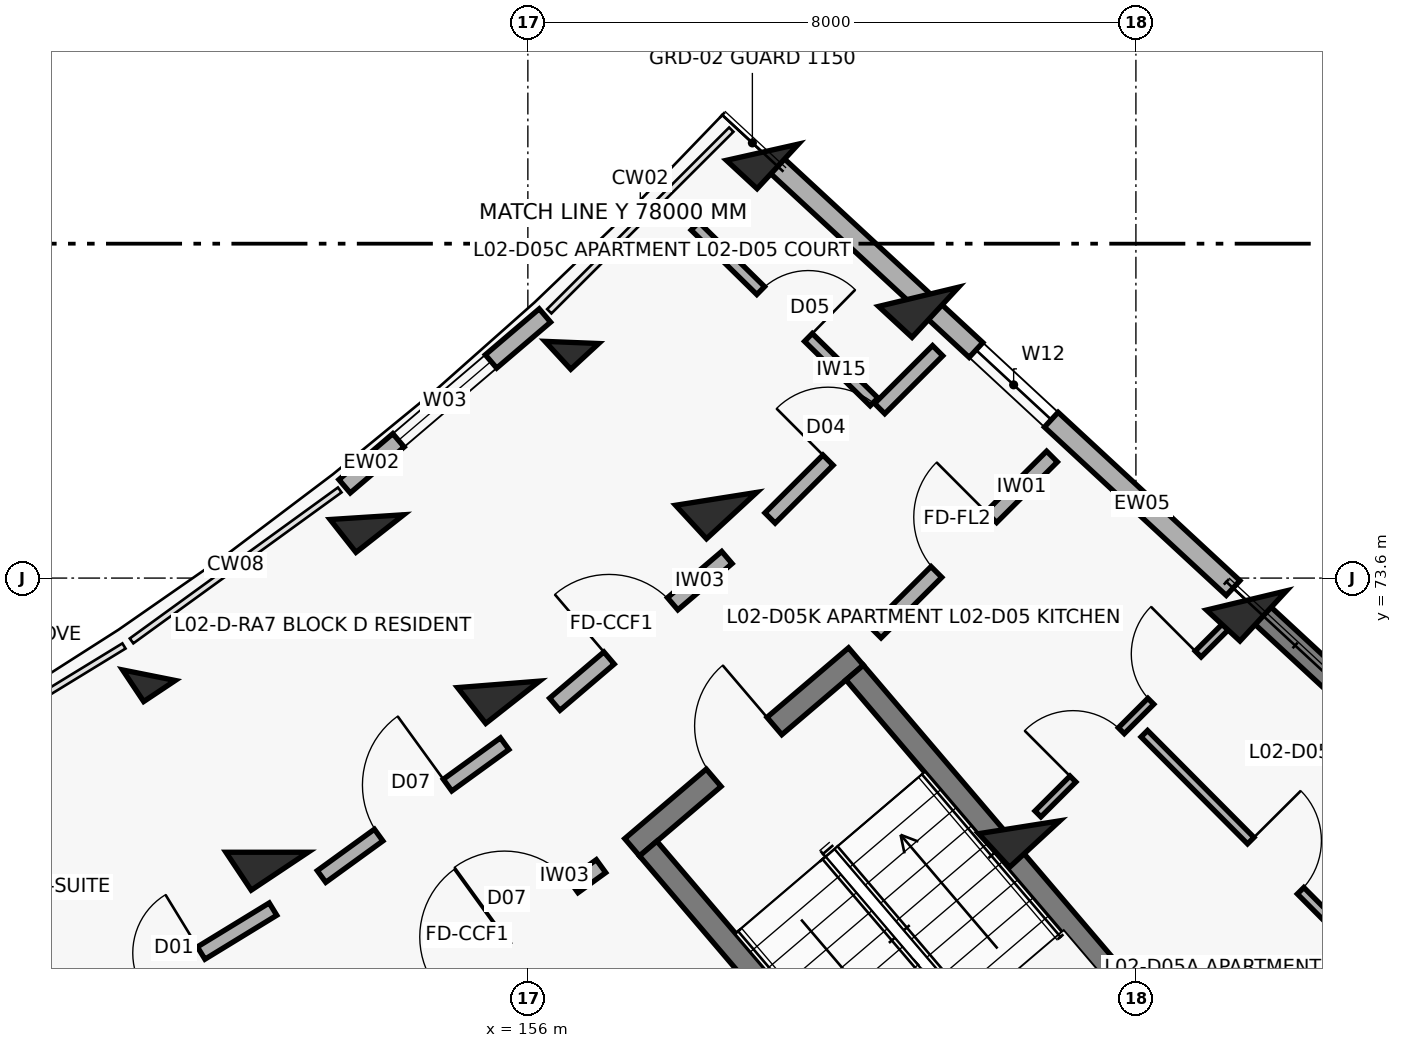
"""IFC4 building model, lengths in metres.
Left out: names, types, materials, properties, quantities, classifications, styles, units other than length and angle.
Written with IfcOpenShell. Run it as: python <this file> out.ifc"""

import sys

from ifc_helpers import new_model, si_unit, direction, frame, frame_2d, origin, origin_2d, place, context, subcontext, project, spatial, rectangle, extrude, element, fill, save


model = new_model("IFC4")
c1 = context("Model", 3, precision=1e-05, world=origin(), true_north=direction((0.0, 1.0)))
c2 = subcontext(c1, "Body", "Model", "MODEL_VIEW")
j1 = project(units=[si_unit("LENGTHUNIT", "METRE"), si_unit("PLANEANGLEUNIT", "RADIAN")], contexts=[c1])
p1 = place(None, origin())
s1 = spatial("IfcSite", under=j1, at=p1, CompositionType="ELEMENT")
p2 = place(p1, origin())
s2 = spatial("IfcBuilding", under=s1, at=p2, CompositionType="ELEMENT")
p3 = place(p2, frame((0.0, 0.0, 8.1)))
s3 = spatial("IfcBuildingStorey", under=s2, at=p3, CompositionType="ELEMENT", Elevation=8.1)
p4 = place(p3, frame((149.358, 68.03, 0.0), z_axis=(0.0, 0.0, 1.0), x_axis=(0.487859659139, -0.87292207727, 0.0)))
e1 = element("IfcColumn", 1, at=p4, inside=s3, PredefinedType="COLUMN", context=c2, shape_type="SweptSolid", body=[
    extrude(rectangle(XDim=0.6, YDim=0.9, at=origin_2d()), origin(), (0.0, 0.0, 1.0), 3.1),
])
p5 = place(p3, frame((151.015, 72.322, 0.0), z_axis=(0.0, 0.0, 1.0), x_axis=(0.554844427448, -0.83195412213, 0.0)))
e2 = element("IfcColumn", 2, at=p5, inside=s3, PredefinedType="COLUMN", context=c2, shape_type="SweptSolid", body=[
    extrude(rectangle(XDim=0.5, YDim=0.5, at=origin_2d()), origin(), (0.0, 0.0, 1.0), 3.1),
])
p6 = place(p3, frame((152.568, 69.993, 0.0), z_axis=(0.0, 0.0, 1.0), x_axis=(0.554844427448, -0.83195412213, 0.0)))
e3 = element("IfcColumn", 3, at=p6, inside=s3, PredefinedType="COLUMN", context=c2, shape_type="SweptSolid", body=[
    extrude(rectangle(XDim=0.6, YDim=0.9, at=origin_2d()), origin(), (0.0, 0.0, 1.0), 3.1),
])
p7 = place(p3, frame((153.883, 74.402, 0.0), z_axis=(0.0, 0.0, 1.0), x_axis=(0.618408395358, -0.785856893175, 0.0)))
e4 = element("IfcColumn", 4, at=p7, inside=s3, PredefinedType="COLUMN", context=c2, shape_type="SweptSolid", body=[
    extrude(rectangle(XDim=0.55, YDim=0.8, at=origin_2d()), origin(), (0.0, 0.0, 1.0), 3.1),
])
p8 = place(p3, frame((155.614, 72.202, 0.0), z_axis=(0.0, 0.0, 1.0), x_axis=(0.618408395358, -0.785856893175, 0.0)))
e5 = element("IfcColumn", 5, at=p8, inside=s3, PredefinedType="COLUMN", context=c2, shape_type="SweptSolid", body=[
    extrude(rectangle(XDim=0.6, YDim=0.9, at=origin_2d()), origin(), (0.0, 0.0, 1.0), 3.1),
])
p9 = place(p3, frame((156.579, 76.701, 0.0), z_axis=(0.0, 0.0, 1.0), x_axis=(0.678159669868, -0.73491459515, 0.0)))
e6 = element("IfcColumn", 6, at=p9, inside=s3, PredefinedType="COLUMN", context=c2, shape_type="SweptSolid", body=[
    extrude(rectangle(XDim=0.5, YDim=0.5, at=origin_2d()), origin(), (0.0, 0.0, 1.0), 3.1),
])
for number, where, z_axis, x_axis in (
    (7, (158.477, 74.643, 0.0), (0.0, 0.0, 1.0), (0.678, -0.735, 0.0)),
    (8, (162.465, 70.322, 0.0), (0.0, 0.0, 1.0), (0.678, -0.735, 0.0)),
):
    element("IfcColumn", number, at=place(p3, frame(where, z_axis=z_axis, x_axis=x_axis)), inside=s3, PredefinedType="COLUMN", context=c2, shape_type="SweptSolid", body=[
        extrude(rectangle(XDim=0.6, YDim=0.9, at=origin_2d()), origin(), (0.0, 0.0, 1.0), 3.1),
    ])
p10 = place(p3, frame((159.086, 79.204, 0.0), z_axis=(0.0, 0.0, 1.0), x_axis=(0.733729864503, -0.679441304262, 0.0)))
e9 = element("IfcColumn", 9, at=p10, inside=s3, PredefinedType="COLUMN", context=c2, shape_type="SweptSolid", body=[
    extrude(rectangle(XDim=0.55, YDim=0.8, at=origin_2d()), origin(), (0.0, 0.0, 1.0), 3.1),
])
for number, where, z_axis, x_axis in (
    (10, (161.14, 77.301, 0.0), (0.0, 0.0, 1.0), (0.734, -0.679, 0.0)),
    (11, (165.455, 73.306, 0.0), (0.0, 0.0, 1.0), (0.734, -0.679, 0.0)),
):
    element("IfcColumn", number, at=place(p3, frame(where, z_axis=z_axis, x_axis=x_axis)), inside=s3, PredefinedType="COLUMN", context=c2, shape_type="SweptSolid", body=[
        extrude(rectangle(XDim=0.6, YDim=0.9, at=origin_2d()), origin(), (0.0, 0.0, 1.0), 3.1),
    ])
p11 = place(p3, frame((165.587, 73.184, 0.0), z_axis=(0.0, 0.0, 1.0), x_axis=(0.733739663667, -0.679430721974, 0.0)))
e12 = element("IfcWall", 12, at=p11, inside=s3, PredefinedType="SHEAR", context=c2, shape_type="SweptSolid", body=[
    extrude(rectangle(XDim=4.72, YDim=0.31, at=frame_2d((2.36, 0.0))), origin(), (0.0, 0.0, 1.0), 2.86),
])
p12 = place(p3, frame((153.589, 74.808, 0.0), z_axis=(0.0, 0.0, 1.0), x_axis=(0.760985425115, 0.648768974876, 0.0)))
e13 = element("IfcWall", 13, at=p12, inside=s3, PredefinedType="SOLIDWALL", context=c2, shape_type="SweptSolid", body=[
    extrude(rectangle(XDim=3.464, YDim=0.23, at=frame_2d((1.732, 0.0))), origin(), (0.0, 0.0, 1.0), 2.25),
])
p13 = place(p12, frame((0.932, 0.0, 0.32)))
e14 = element("IfcOpeningElement", 14, at=p13, cuts=e13, PredefinedType="OPENING", context=c2, shape_type="SweptSolid", body=[
    extrude(rectangle(XDim=1.6, YDim=1.5, at=frame_2d((0.8, 0.75))), frame((0.0, 0.125, 0.0), z_axis=(0.0, -1.0, 0.0), x_axis=(1.0, 0.0, 0.0)), (0.0, 0.0, 1.0), 0.25),
])
p14 = place(p3, frame((159.262, 79.041, 0.0), z_axis=(0.0, 0.0, 1.0), x_axis=(0.733738684326, -0.679431779595, 0.0)))
e15 = element("IfcWall", 15, at=p14, inside=s3, PredefinedType="SOLIDWALL", context=c2, shape_type="SweptSolid", body=[
    extrude(rectangle(XDim=8.2, YDim=0.265, at=frame_2d((4.1, 0.0))), origin(), (0.0, 0.0, 1.0), 2.08),
])
p15 = place(p14, frame((3.59, 0.0, 0.75)))
e16 = element("IfcOpeningElement", 16, at=p15, cuts=e15, PredefinedType="OPENING", context=c2, shape_type="SweptSolid", body=[
    extrude(rectangle(XDim=1.35, YDim=1.35, at=frame_2d((0.675, 0.675))), frame((0.0, 0.142, 0.0), z_axis=(0.0, -1.0, 0.0), x_axis=(1.0, 0.0, 0.0)), (0.0, 0.0, 1.0), 0.285),
])
p16 = place(p3, frame((157.372, 70.058, 0.0), z_axis=(0.0, 0.0, 1.0), x_axis=(0.760990583254, 0.648762924495, 0.0)))
e17 = element("IfcWall", 17, at=p16, inside=s3, PredefinedType="SHEAR", context=c2, shape_type="SweptSolid", body=[
    extrude(rectangle(XDim=3.87, YDim=0.3, at=frame_2d((1.935, 0.0))), origin(), (0.0, 0.0, 1.0), 3.1),
])
p17 = place(p16, frame((1.41, 0.0, 0.0)))
e18 = element("IfcOpeningElement", 18, at=p17, cuts=e17, PredefinedType="OPENING", context=c2, shape_type="SweptSolid", body=[
    extrude(rectangle(XDim=1.05, YDim=2.15, at=frame_2d((0.525, 1.075))), frame((0.0, 0.16, 0.0), z_axis=(0.0, -1.0, 0.0), x_axis=(1.0, 0.0, 0.0)), (0.0, 0.0, 1.0), 0.32),
])
p18 = place(p3, frame((157.583, 70.041, 0.0), z_axis=(0.0, 0.0, 1.0), x_axis=(0.648762810187, -0.760990680704, 0.0)))
e19 = element("IfcWall", 19, at=p18, inside=s3, PredefinedType="SHEAR", context=c2, shape_type="SweptSolid", body=[
    extrude(rectangle(XDim=7.69, YDim=0.3, at=frame_2d((3.845, 0.0))), origin(), (0.0, 0.0, 1.0), 3.1),
])
p19 = place(p3, frame((160.3, 72.357, 0.0), z_axis=(0.0, 0.0, 1.0), x_axis=(0.648781194888, -0.760975006922, 0.0)))
e20 = element("IfcWall", 20, at=p19, inside=s3, PredefinedType="SHEAR", context=c2, shape_type="SweptSolid", body=[
    extrude(rectangle(XDim=7.69, YDim=0.3, at=frame_2d((3.845, 0.0))), origin(), (0.0, 0.0, 1.0), 3.1),
])
p20 = place(p3, frame((149.989, 67.619, 0.0), z_axis=(0.0, 0.0, 1.0), x_axis=(0.853121049608, 0.5217130195, 0.0)))
e21 = element("IfcWall", 21, at=p20, inside=s3, PredefinedType="SOLIDWALL", context=c2, shape_type="SweptSolid", body=[
    extrude(rectangle(XDim=3.116, YDim=0.19, at=frame_2d((1.558, 0.0))), origin(), (0.0, 0.0, 1.0), 2.08),
])
p21 = place(p20, frame((1.108, 0.0, 0.0)))
e22 = element("IfcOpeningElement", 22, at=p21, cuts=e21, PredefinedType="OPENING", context=c2, shape_type="SweptSolid", body=[
    extrude(rectangle(XDim=0.9, YDim=2.1, at=frame_2d((0.45, 1.05))), frame((0.0, 0.105, 0.0), z_axis=(0.0, -1.0, 0.0), x_axis=(1.0, 0.0, 0.0)), (0.0, 0.0, 1.0), 0.21),
])
p22 = place(p3, frame((154.423, 67.968, 0.0), z_axis=(0.0, 0.0, 1.0), x_axis=(0.809516127005, 0.587097641043, 0.0)))
e23 = element("IfcWall", 23, at=p22, inside=s3, PredefinedType="SOLIDWALL", context=c2, shape_type="SweptSolid", body=[
    extrude(rectangle(XDim=3.137, YDim=0.21, at=frame_2d((1.569, 0.0))), origin(), (0.0, 0.0, 1.0), 2.08),
])
p23 = place(p22, frame((0.45, 0.0, 0.0)))
e24 = element("IfcOpeningElement", 24, at=p23, cuts=e23, PredefinedType="OPENING", context=c2, shape_type="SweptSolid", body=[
    extrude(rectangle(XDim=1.1, YDim=2.15, at=frame_2d((0.55, 1.075))), frame((0.0, 0.115, 0.0), z_axis=(0.0, -1.0, 0.0), x_axis=(1.0, 0.0, 0.0)), (0.0, 0.0, 1.0), 0.23),
])
p24 = place(p22, frame((1.567, 0.0, 0.0)))
e25 = element("IfcOpeningElement", 25, at=p24, cuts=e23, PredefinedType="OPENING", context=c2, shape_type="SweptSolid", body=[
    extrude(rectangle(XDim=1.12, YDim=2.15, at=frame_2d((0.56, 1.075))), frame((0.0, 0.115, 0.0), z_axis=(0.0, -1.0, 0.0), x_axis=(1.0, 0.0, 0.0)), (0.0, 0.0, 1.0), 0.23),
])
p25 = place(p3, frame((153.285, 69.674, 0.0), z_axis=(0.0, 0.0, 1.0), x_axis=(0.809505174959, 0.587112741911, 0.0)))
e26 = element("IfcWall", 26, at=p25, inside=s3, PredefinedType="SOLIDWALL", context=c2, shape_type="SweptSolid", body=[
    extrude(rectangle(XDim=2.976, YDim=0.19, at=frame_2d((1.488, 0.0))), origin(), (0.0, 0.0, 1.0), 2.08),
])
p26 = place(p25, frame((0.928, 0.0, 0.0)))
e27 = element("IfcOpeningElement", 27, at=p26, cuts=e26, PredefinedType="OPENING", context=c2, shape_type="SweptSolid", body=[
    extrude(rectangle(XDim=1.12, YDim=2.15, at=frame_2d((0.56, 1.075))), frame((0.0, 0.105, 0.0), z_axis=(0.0, -1.0, 0.0), x_axis=(1.0, 0.0, 0.0)), (0.0, 0.0, 1.0), 0.21),
])
p27 = place(p3, frame((156.354, 71.94, 0.0), z_axis=(0.0, 0.0, 1.0), x_axis=(0.760991187621, 0.648762215579, 0.0)))
e28 = element("IfcWall", 28, at=p27, inside=s3, PredefinedType="SOLIDWALL", context=c2, shape_type="SweptSolid", body=[
    extrude(rectangle(XDim=2.976, YDim=0.21, at=frame_2d((1.488, 0.0))), origin(), (0.0, 0.0, 1.0), 2.08),
])
p28 = place(p27, frame((0.938, 0.0, 0.0)))
e29 = element("IfcOpeningElement", 29, at=p28, cuts=e28, PredefinedType="OPENING", context=c2, shape_type="SweptSolid", body=[
    extrude(rectangle(XDim=1.1, YDim=2.15, at=frame_2d((0.55, 1.075))), frame((0.0, 0.115, 0.0), z_axis=(0.0, -1.0, 0.0), x_axis=(1.0, 0.0, 0.0)), (0.0, 0.0, 1.0), 0.23),
])
p29 = place(p3, frame((160.576, 72.884, 0.0), z_axis=(0.0, 0.0, 1.0), x_axis=(0.70773973846, 0.706473256822, 0.0)))
e30 = element("IfcWall", 30, at=p29, inside=s3, PredefinedType="SOLIDWALL", context=c2, shape_type="SweptSolid", body=[
    extrude(rectangle(XDim=3.277, YDim=0.2, at=frame_2d((1.639, 0.0))), origin(), (0.0, 0.0, 1.0), 2.08),
])
p30 = place(p29, frame((1.128, 0.0, 0.0)))
e31 = element("IfcOpeningElement", 31, at=p30, cuts=e30, PredefinedType="OPENING", context=c2, shape_type="SweptSolid", body=[
    extrude(rectangle(XDim=1.02, YDim=2.15, at=frame_2d((0.51, 1.075))), frame((0.0, 0.11, 0.0), z_axis=(0.0, -1.0, 0.0), x_axis=(1.0, 0.0, 0.0)), (0.0, 0.0, 1.0), 0.22),
])
p31 = place(p3, frame((159.186, 74.39, 0.0), z_axis=(0.0, 0.0, 1.0), x_axis=(0.70773330139, 0.706479705373, 0.0)))
e32 = element("IfcWall", 32, at=p31, inside=s3, PredefinedType="SOLIDWALL", context=c2, shape_type="SweptSolid", body=[
    extrude(rectangle(XDim=3.116, YDim=0.19, at=frame_2d((1.558, 0.0))), origin(), (0.0, 0.0, 1.0), 2.08),
])
p32 = place(p31, frame((1.078, 0.0, 0.0)))
e33 = element("IfcOpeningElement", 33, at=p32, cuts=e32, PredefinedType="OPENING", context=c2, shape_type="SweptSolid", body=[
    extrude(rectangle(XDim=0.96, YDim=2.1, at=frame_2d((0.48, 1.05))), frame((0.0, 0.105, 0.0), z_axis=(0.0, -1.0, 0.0), x_axis=(1.0, 0.0, 0.0)), (0.0, 0.0, 1.0), 0.21),
])
p33 = place(p3, frame((158.2, 78.23, 0.0), z_axis=(0.0, 0.0, 1.0), x_axis=(0.713587506757, -0.700566106945, 0.0)))
e34 = element("IfcWall", 34, at=p33, inside=s3, PredefinedType="PARTITIONING", context=c2, shape_type="SweptSolid", body=[
    extrude(rectangle(XDim=3.3, YDim=0.145, at=frame_2d((1.65, 0.0))), origin(), (0.0, 0.0, 1.0), 2.08),
])
p34 = place(p33, frame((1.21, 0.0, 0.0)))
e35 = element("IfcOpeningElement", 35, at=p34, cuts=e34, PredefinedType="OPENING", context=c2, shape_type="SweptSolid", body=[
    extrude(rectangle(XDim=0.88, YDim=2.1, at=frame_2d((0.44, 1.05))), frame((0.0, 0.083, 0.0), z_axis=(0.0, -1.0, 0.0), x_axis=(1.0, 0.0, 0.0)), (0.0, 0.0, 1.0), 0.165),
])
p35 = place(p3, frame((162.711, 70.497, 0.0), z_axis=(0.0, 0.0, 1.0), x_axis=(0.70774573777, 0.706467246706, 0.0)))
e36 = element("IfcWall", 36, at=p35, inside=s3, PredefinedType="PARTITIONING", context=c2, shape_type="SweptSolid", body=[
    extrude(rectangle(XDim=3.628, YDim=0.11, at=frame_2d((1.814, 0.0))), origin(), (0.0, 0.0, 1.0), 2.08),
])
p36 = place(p35, frame((0.65, 0.0, 0.0)))
e37 = element("IfcOpeningElement", 37, at=p36, cuts=e36, PredefinedType="OPENING", context=c2, shape_type="SweptSolid", body=[
    extrude(rectangle(XDim=0.9, YDim=2.1, at=frame_2d((0.45, 1.05))), frame((0.0, 0.065, 0.0), z_axis=(0.0, -1.0, 0.0), x_axis=(1.0, 0.0, 0.0)), (0.0, 0.0, 1.0), 0.13),
])
p37 = place(p35, frame((2.098, 0.0, 0.0)))
e38 = element("IfcOpeningElement", 38, at=p37, cuts=e36, PredefinedType="OPENING", context=c2, shape_type="SweptSolid", body=[
    extrude(rectangle(XDim=0.88, YDim=2.1, at=frame_2d((0.44, 1.05))), frame((0.0, 0.065, 0.0), z_axis=(0.0, -1.0, 0.0), x_axis=(1.0, 0.0, 0.0)), (0.0, 0.0, 1.0), 0.13),
])
p38 = place(p3, frame((164.11, 71.552, 0.0), z_axis=(0.0, 0.0, 1.0), x_axis=(0.705460671411, -0.708749067789, 0.0)))
e39 = element("IfcWall", 39, at=p38, inside=s3, PredefinedType="PARTITIONING", context=c2, shape_type="SweptSolid", body=[
    extrude(rectangle(XDim=4.9, YDim=0.12, at=frame_2d((2.45, 0.0))), origin(), (0.0, 0.0, 1.0), 2.08),
])
p39 = place(p38, frame((1.985, 0.0, 0.0)))
e40 = element("IfcOpeningElement", 40, at=p39, cuts=e39, PredefinedType="OPENING", context=c2, shape_type="SweptSolid", body=[
    extrude(rectangle(XDim=0.93, YDim=2.1, at=frame_2d((0.465, 1.05))), frame((0.0, 0.07, 0.0), z_axis=(0.0, -1.0, 0.0), x_axis=(1.0, 0.0, 0.0)), (0.0, 0.0, 1.0), 0.14),
])
p40 = place(p13, origin())
e41 = element("IfcWindow", 41, at=p40, inside=s3, PartitioningType="DOUBLE_PANEL_VERTICAL", PredefinedType="WINDOW", context=c2, shape_type="SweptSolid", body=[
    extrude(rectangle(XDim=1.6, YDim=1.5, at=frame_2d((0.8, 0.75))), frame((0.0, 0.03, 0.0), z_axis=(0.0, -1.0, 0.0), x_axis=(1.0, 0.0, 0.0)), (0.0, 0.0, 1.0), 0.06),
])
fill(e14, e41)
p41 = place(p15, origin())
e42 = element("IfcWindow", 42, at=p41, inside=s3, PartitioningType="DOUBLE_PANEL_VERTICAL", PredefinedType="WINDOW", context=c2, shape_type="SweptSolid", body=[
    extrude(rectangle(XDim=1.35, YDim=1.35, at=frame_2d((0.675, 0.675))), frame((0.0, 0.03, 0.0), z_axis=(0.0, -1.0, 0.0), x_axis=(1.0, 0.0, 0.0)), (0.0, 0.0, 1.0), 0.06),
])
fill(e16, e42)
p42 = place(p17, origin())
e43 = element("IfcDoor", 43, at=p42, inside=s3, OperationType="SINGLE_SWING_RIGHT", PredefinedType="DOOR", context=c2, shape_type="SweptSolid", body=[
    extrude(rectangle(XDim=1.05, YDim=2.15, at=frame_2d((0.525, 1.075))), frame((0.0, 0.025, 0.0), z_axis=(0.0, -1.0, 0.0), x_axis=(1.0, 0.0, 0.0)), (0.0, 0.0, 1.0), 0.05),
])
fill(e18, e43)
p43 = place(p21, origin())
e44 = element("IfcDoor", 44, at=p43, inside=s3, OperationType="SINGLE_SWING_RIGHT", PredefinedType="DOOR", context=c2, shape_type="SweptSolid", body=[
    extrude(rectangle(XDim=0.9, YDim=2.1, at=frame_2d((0.45, 1.05))), frame((0.0, 0.025, 0.0), z_axis=(0.0, -1.0, 0.0), x_axis=(1.0, 0.0, 0.0)), (0.0, 0.0, 1.0), 0.05),
])
fill(e22, e44)
p44 = place(p23, origin())
e45 = element("IfcDoor", 45, at=p44, inside=s3, OperationType="SINGLE_SWING_RIGHT", PredefinedType="DOOR", context=c2, shape_type="SweptSolid", body=[
    extrude(rectangle(XDim=1.1, YDim=2.15, at=frame_2d((0.55, 1.075))), frame((0.0, 0.025, 0.0), z_axis=(0.0, -1.0, 0.0), x_axis=(1.0, 0.0, 0.0)), (0.0, 0.0, 1.0), 0.05),
])
fill(e24, e45)
p45 = place(p24, origin())
e46 = element("IfcDoor", 46, at=p45, inside=s3, OperationType="SINGLE_SWING_LEFT", PredefinedType="DOOR", context=c2, shape_type="SweptSolid", body=[
    extrude(rectangle(XDim=1.12, YDim=2.15, at=frame_2d((0.56, 1.075))), frame((0.0, 0.025, 0.0), z_axis=(0.0, -1.0, 0.0), x_axis=(1.0, 0.0, 0.0)), (0.0, 0.0, 1.0), 0.05),
])
fill(e25, e46)
p46 = place(p26, origin())
e47 = element("IfcDoor", 47, at=p46, inside=s3, OperationType="SINGLE_SWING_RIGHT", PredefinedType="DOOR", context=c2, shape_type="SweptSolid", body=[
    extrude(rectangle(XDim=1.12, YDim=2.15, at=frame_2d((0.56, 1.075))), frame((0.0, 0.025, 0.0), z_axis=(0.0, -1.0, 0.0), x_axis=(1.0, 0.0, 0.0)), (0.0, 0.0, 1.0), 0.05),
])
fill(e27, e47)
p47 = place(p28, origin())
e48 = element("IfcDoor", 48, at=p47, inside=s3, OperationType="SINGLE_SWING_LEFT", PredefinedType="DOOR", context=c2, shape_type="SweptSolid", body=[
    extrude(rectangle(XDim=1.1, YDim=2.15, at=frame_2d((0.55, 1.075))), frame((0.0, 0.025, 0.0), z_axis=(0.0, -1.0, 0.0), x_axis=(1.0, 0.0, 0.0)), (0.0, 0.0, 1.0), 0.05),
])
fill(e29, e48)
p48 = place(p30, origin())
e49 = element("IfcDoor", 49, at=p48, inside=s3, OperationType="SINGLE_SWING_RIGHT", PredefinedType="DOOR", context=c2, shape_type="SweptSolid", body=[
    extrude(rectangle(XDim=1.02, YDim=2.15, at=frame_2d((0.51, 1.075))), frame((0.0, 0.025, 0.0), z_axis=(0.0, -1.0, 0.0), x_axis=(1.0, 0.0, 0.0)), (0.0, 0.0, 1.0), 0.05),
])
fill(e31, e49)
p49 = place(p32, origin())
e50 = element("IfcDoor", 50, at=p49, inside=s3, OperationType="SINGLE_SWING_LEFT", PredefinedType="DOOR", context=c2, shape_type="SweptSolid", body=[
    extrude(rectangle(XDim=0.96, YDim=2.1, at=frame_2d((0.48, 1.05))), frame((0.0, 0.025, 0.0), z_axis=(0.0, -1.0, 0.0), x_axis=(1.0, 0.0, 0.0)), (0.0, 0.0, 1.0), 0.05),
])
fill(e33, e50)
p50 = place(p34, origin())
e51 = element("IfcDoor", 51, at=p50, inside=s3, OperationType="SINGLE_SWING_RIGHT", PredefinedType="DOOR", context=c2, shape_type="SweptSolid", body=[
    extrude(rectangle(XDim=0.88, YDim=2.1, at=frame_2d((0.44, 1.05))), frame((0.0, 0.025, 0.0), z_axis=(0.0, -1.0, 0.0), x_axis=(1.0, 0.0, 0.0)), (0.0, 0.0, 1.0), 0.05),
])
fill(e35, e51)
p51 = place(p36, origin())
e52 = element("IfcDoor", 52, at=p51, inside=s3, OperationType="SINGLE_SWING_LEFT", PredefinedType="DOOR", context=c2, shape_type="SweptSolid", body=[
    extrude(rectangle(XDim=0.9, YDim=2.1, at=frame_2d((0.45, 1.05))), frame((0.0, 0.025, 0.0), z_axis=(0.0, -1.0, 0.0), x_axis=(1.0, 0.0, 0.0)), (0.0, 0.0, 1.0), 0.05),
])
fill(e37, e52)
p52 = place(p37, origin())
e53 = element("IfcDoor", 53, at=p52, inside=s3, OperationType="SINGLE_SWING_RIGHT", PredefinedType="DOOR", context=c2, shape_type="SweptSolid", body=[
    extrude(rectangle(XDim=0.88, YDim=2.1, at=frame_2d((0.44, 1.05))), frame((0.0, 0.025, 0.0), z_axis=(0.0, -1.0, 0.0), x_axis=(1.0, 0.0, 0.0)), (0.0, 0.0, 1.0), 0.05),
])
fill(e38, e53)
p53 = place(p39, origin())
e54 = element("IfcDoor", 54, at=p53, inside=s3, OperationType="SINGLE_SWING_LEFT", PredefinedType="DOOR", context=c2, shape_type="SweptSolid", body=[
    extrude(rectangle(XDim=0.93, YDim=2.1, at=frame_2d((0.465, 1.05))), frame((0.0, 0.025, 0.0), z_axis=(0.0, -1.0, 0.0), x_axis=(1.0, 0.0, 0.0)), (0.0, 0.0, 1.0), 0.05),
])
fill(e40, e54)
save(model, sys.argv[1])
